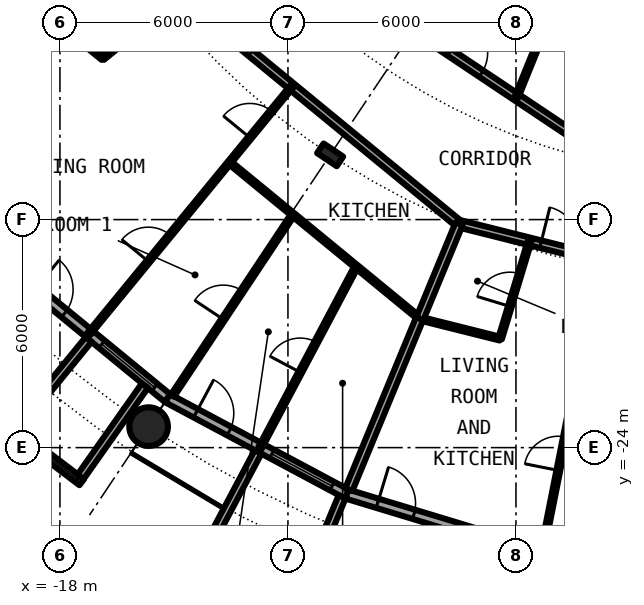
"""IFC4 building model, lengths in metres.
Left out: names, types, materials, properties, quantities, classifications, styles, units other than length and angle.
Written with IfcOpenShell. Run it as: python <this file> out.ifc"""

import sys

from ifc_helpers import new_model, si_unit, direction, frame, frame_2d, origin, origin_2d, place, context, subcontext, project, spatial, rectangle, circle, hollow_circle, i_section, extrude, element, fill, save


model = new_model("IFC4")
c1 = context("Model", 3, precision=1e-05, world=origin(), true_north=direction((0.0, 1.0)))
c2 = subcontext(c1, "Body", "Model", "MODEL_VIEW")
j1 = project(units=[si_unit("LENGTHUNIT", "METRE"), si_unit("PLANEANGLEUNIT", "RADIAN")], contexts=[c1])
p1 = place(None, origin())
s1 = spatial("IfcSite", under=j1, at=p1, CompositionType="ELEMENT")
p2 = place(p1, origin())
s2 = spatial("IfcBuilding", under=s1, at=p2, CompositionType="ELEMENT")
p3 = place(p2, frame((0.0, 0.0, 35.0)))
s3 = spatial("IfcBuildingStorey", under=s2, at=p3, CompositionType="ELEMENT", Elevation=35.0)
p4 = place(p3, frame((-15.667, -23.448, 0.0), z_axis=(0.0, 0.0, 1.0), x_axis=(1.0, 0.0, 0.0)))
e1 = element("IfcColumn", 1, at=p4, inside=s3, PredefinedType="COLUMN", context=c2, shape_type="SweptSolid", body=[
    extrude(hollow_circle(Radius=0.508, WallThickness=0.05, at=origin_2d()), origin(), (0.0, 0.0, 1.0), 3.05),
])
p5 = place(p3, frame((-10.889, -16.297, 0.0), z_axis=(0.0, 0.0, 1.0), x_axis=(-0.55557023302, -0.831469612303, 0.0)))
e2 = element("IfcColumn", 2, at=p5, inside=s3, PredefinedType="COLUMN", context=c2, shape_type="SweptSolid", body=[
    extrude(i_section(OverallWidth=0.305, OverallDepth=0.62, WebThickness=0.021, FlangeThickness=0.04, FilletRadius=0.027, at=origin_2d()), origin(), (0.0, 0.0, 1.0), 3.05),
])
p6 = place(p3, frame((-19.304, -19.304, 0.0), z_axis=(0.0, 0.0, 1.0), x_axis=(0.773019449054, -0.634382322723, 0.0)))
e3 = element("IfcWall", 3, at=p6, inside=s3, PredefinedType="SOLIDWALL", context=c2, shape_type="SweptSolid", body=[
    extrude(rectangle(XDim=5.352, YDim=0.25, at=frame_2d((2.676, 0.0))), origin(), (0.0, 0.0, 1.0), 2.7),
])
p7 = place(p6, frame((0.841, 0.0, 0.0)))
e4 = element("IfcOpeningElement", 4, at=p7, cuts=e3, PredefinedType="OPENING", context=c2, shape_type="SweptSolid", body=[
    extrude(rectangle(XDim=1.0, YDim=2.2, at=frame_2d((0.5, 1.1))), frame((0.0, 0.135, 0.0), z_axis=(0.0, -1.0, 0.0), x_axis=(1.0, 0.0, 0.0)), (0.0, 0.0, 1.0), 0.27),
])
p8 = place(p6, frame((3.111, 0.0, 0.3)))
e5 = element("IfcOpeningElement", 5, at=p8, cuts=e3, PredefinedType="OPENING", context=c2, shape_type="SweptSolid", body=[
    extrude(rectangle(XDim=1.8, YDim=2.1, at=frame_2d((0.9, 1.05))), frame((0.0, 0.135, 0.0), z_axis=(0.0, -1.0, 0.0), x_axis=(1.0, 0.0, 0.0)), (0.0, 0.0, 1.0), 0.27),
])
p9 = place(p3, frame((-19.289, -23.497, -0.03), z_axis=(0.0, 0.0, 1.0), x_axis=(0.796842165306, -0.60418752353, 0.0)))
e6 = element("IfcWall", 6, at=p9, inside=s3, PredefinedType="SOLIDWALL", context=c2, shape_type="SweptSolid", body=[
    extrude(rectangle(XDim=2.337, YDim=0.2, at=frame_2d((1.168, 0.0))), origin(), (0.0, 0.0, 1.0), 2.73),
])
p10 = place(p9, frame((0.128, 0.0, 0.33)))
e7 = element("IfcOpeningElement", 7, at=p10, cuts=e6, PredefinedType="OPENING", context=c2, shape_type="SweptSolid", body=[
    extrude(circle(Radius=1.04, at=frame_2d((1.04, 1.04))), frame((0.0, 0.11, 0.0), z_axis=(0.0, -1.0, 0.0), x_axis=(1.0, 0.0, 0.0)), (0.0, 0.0, 1.0), 0.22),
])
p11 = place(p3, frame((-17.246, -21.155, -0.03), z_axis=(0.0, 0.0, 1.0), x_axis=(-0.631741648902, -0.775179004516, 0.0)))
e8 = element("IfcWall", 8, at=p11, inside=s3, PredefinedType="SOLIDWALL", context=c2, shape_type="SweptSolid", body=[
    extrude(rectangle(XDim=3.006, YDim=0.2, at=frame_2d((1.503, 0.0))), origin(), (0.0, 0.0, 1.0), 2.73),
])
p12 = place(p3, frame((-15.765, -22.37, -0.03), z_axis=(0.0, 0.0, 1.0), x_axis=(-0.576274612209, -0.817256123454, 0.0)))
e9 = element("IfcWall", 9, at=p12, inside=s3, PredefinedType="SOLIDWALL", context=c2, shape_type="SweptSolid", body=[
    extrude(rectangle(XDim=2.933, YDim=0.2, at=frame_2d((1.466, 0.0))), origin(), (0.0, 0.0, 1.0), 2.73),
])
p13 = place(p3, frame((-15.167, -22.699, 0.0), z_axis=(0.0, 0.0, 1.0), x_axis=(0.881915646801, -0.471407246368, 0.0)))
e10 = element("IfcWall", 10, at=p13, inside=s3, PredefinedType="SOLIDWALL", context=c2, shape_type="SweptSolid", body=[
    extrude(rectangle(XDim=5.352, YDim=0.25, at=frame_2d((2.676, 0.0))), origin(), (0.0, 0.0, 1.0), 2.7),
])
p14 = place(p13, frame((0.841, 0.0, 0.0)))
e11 = element("IfcOpeningElement", 11, at=p14, cuts=e10, PredefinedType="OPENING", context=c2, shape_type="SweptSolid", body=[
    extrude(rectangle(XDim=1.0, YDim=2.2, at=frame_2d((0.5, 1.1))), frame((0.0, 0.135, 0.0), z_axis=(0.0, -1.0, 0.0), x_axis=(1.0, 0.0, 0.0)), (0.0, 0.0, 1.0), 0.27),
])
p15 = place(p13, frame((3.111, 0.0, 0.3)))
e12 = element("IfcOpeningElement", 12, at=p15, cuts=e10, PredefinedType="OPENING", context=c2, shape_type="SweptSolid", body=[
    extrude(rectangle(XDim=1.8, YDim=2.1, at=frame_2d((0.9, 1.05))), frame((0.0, 0.135, 0.0), z_axis=(0.0, -1.0, 0.0), x_axis=(1.0, 0.0, 0.0)), (0.0, 0.0, 1.0), 0.27),
])
p16 = place(p3, frame((-12.787, -24.113, -0.03), z_axis=(0.0, 0.0, 1.0), x_axis=(-0.468365282436, -0.883534924159, 0.0)))
e13 = element("IfcWall", 13, at=p16, inside=s3, PredefinedType="SOLIDWALL", context=c2, shape_type="SweptSolid", body=[
    extrude(rectangle(XDim=3.006, YDim=0.2, at=frame_2d((1.503, 0.0))), origin(), (0.0, 0.0, 1.0), 2.73),
])
p17 = place(p3, frame((-10.575, -25.295, -0.03), z_axis=(0.0, 0.0, 1.0), x_axis=(-0.385697364644, -0.922625353492, 0.0)))
e14 = element("IfcWall", 14, at=p17, inside=s3, PredefinedType="SOLIDWALL", context=c2, shape_type="SweptSolid", body=[
    extrude(rectangle(XDim=2.883, YDim=0.2, at=frame_2d((1.442, 0.0))), origin(), (0.0, 0.0, 1.0), 2.73),
])
p18 = place(p3, frame((-10.447, -25.222, 0.0), z_axis=(0.0, 0.0, 1.0), x_axis=(0.956965678721, -0.290201119486, 0.0)))
e15 = element("IfcWall", 15, at=p18, inside=s3, PredefinedType="SOLIDWALL", context=c2, shape_type="SweptSolid", body=[
    extrude(rectangle(XDim=5.351, YDim=0.25, at=frame_2d((2.676, 0.0))), origin(), (0.0, 0.0, 1.0), 2.7),
])
p19 = place(p18, frame((0.841, 0.0, 0.0)))
e16 = element("IfcOpeningElement", 16, at=p19, cuts=e15, PredefinedType="OPENING", context=c2, shape_type="SweptSolid", body=[
    extrude(rectangle(XDim=1.0, YDim=2.2, at=frame_2d((0.5, 1.1))), frame((0.0, 0.135, 0.0), z_axis=(0.0, -1.0, 0.0), x_axis=(1.0, 0.0, 0.0)), (0.0, 0.0, 1.0), 0.27),
])
p20 = place(p18, frame((3.111, 0.0, 0.3)))
e17 = element("IfcOpeningElement", 17, at=p20, cuts=e15, PredefinedType="OPENING", context=c2, shape_type="SweptSolid", body=[
    extrude(rectangle(XDim=1.8, YDim=2.1, at=frame_2d((0.9, 1.05))), frame((0.0, 0.135, 0.0), z_axis=(0.0, -1.0, 0.0), x_axis=(1.0, 0.0, 0.0)), (0.0, 0.0, 1.0), 0.27),
])
p21 = place(p3, frame((-8.534, -20.603, 0.0), z_axis=(0.0, 0.0, 1.0), x_axis=(0.97003047456, -0.242983288366, 0.0)))
e18 = element("IfcWall", 18, at=p21, inside=s3, PredefinedType="PARTITIONING", context=c2, shape_type="SweptSolid", body=[
    extrude(rectangle(XDim=2.181, YDim=0.1, at=frame_2d((1.091, 0.0))), origin(), (0.0, 0.0, 1.0), 2.7),
])
p22 = place(p3, frame((-18.542, -12.389, 0.0), z_axis=(0.0, 0.0, 1.0), x_axis=(0.772948171844, -0.634469166818, 0.0)))
e19 = element("IfcWall", 19, at=p22, inside=s3, PredefinedType="PARTITIONING", context=c2, shape_type="SweptSolid", body=[
    extrude(rectangle(XDim=2.158, YDim=0.1, at=frame_2d((1.079, 0.0))), origin(), (0.0, 0.0, 1.0), 2.7),
])
p23 = place(p3, frame((-13.538, -16.496, 0.0), z_axis=(0.0, 0.0, 1.0), x_axis=(0.773000340237, -0.634405606843, 0.0)))
e20 = element("IfcWall", 20, at=p23, inside=s3, PredefinedType="PARTITIONING", context=c2, shape_type="SweptSolid", body=[
    extrude(rectangle(XDim=6.474, YDim=0.1, at=frame_2d((3.237, 0.0))), origin(), (0.0, 0.0, 1.0), 2.7),
])
p24 = place(p3, frame((-7.501, -18.108, 0.0), z_axis=(0.0, 0.0, 1.0), x_axis=(0.970040840928, -0.242941900323, 0.0)))
e21 = element("IfcWall", 21, at=p24, inside=s3, PredefinedType="PARTITIONING", context=c2, shape_type="SweptSolid", body=[
    extrude(rectangle(XDim=3.676, YDim=0.2, at=frame_2d((1.838, 0.0))), origin(), (0.0, 0.0, 1.0), 2.38),
])
p25 = place(p24, frame((2.217, 0.0, 0.0)))
e22 = element("IfcOpeningElement", 22, at=p25, cuts=e21, PredefinedType="OPENING", context=c2, shape_type="SweptSolid", body=[
    extrude(rectangle(XDim=1.0, YDim=2.3, at=frame_2d((0.5, 1.15))), frame((0.0, 0.11, 0.0), z_axis=(0.0, -1.0, 0.0), x_axis=(1.0, 0.0, 0.0)), (0.0, 0.0, 1.0), 0.22),
])
p26 = place(p3, frame((-16.173, -10.99, 0.0), z_axis=(0.0, 0.0, 1.0), x_axis=(0.772704887747, -0.634765434198, 0.0)))
e23 = element("IfcWall", 23, at=p26, inside=s3, PredefinedType="PARTITIONING", context=c2, shape_type="SweptSolid", body=[
    extrude(rectangle(XDim=11.209, YDim=0.2, at=frame_2d((5.604, 0.0))), origin(), (0.0, 0.0, 1.0), 2.38),
])
p27 = place(p26, frame((3.137, 0.0, 0.0)))
e24 = element("IfcOpeningElement", 24, at=p27, cuts=e23, PredefinedType="OPENING", context=c2, shape_type="SweptSolid", body=[
    extrude(rectangle(XDim=1.0, YDim=2.3, at=frame_2d((0.5, 1.15))), frame((0.0, 0.11, 0.0), z_axis=(0.0, -1.0, 0.0), x_axis=(1.0, 0.0, 0.0)), (0.0, 0.0, 1.0), 0.22),
])
p28 = place(p3, frame((-14.036, -9.402, 0.0), z_axis=(0.0, 0.0, 1.0), x_axis=(0.831561346449, -0.555432918625, 0.0)))
e25 = element("IfcWall", 25, at=p28, inside=s3, PredefinedType="PARTITIONING", context=c2, shape_type="SweptSolid", body=[
    extrude(rectangle(XDim=12.914, YDim=0.2, at=frame_2d((6.457, 0.0))), origin(), (0.0, 0.0, 1.0), 2.7),
])
p29 = place(p28, frame((7.566, 0.0, 0.0)))
e26 = element("IfcOpeningElement", 26, at=p29, cuts=e25, PredefinedType="OPENING", context=c2, shape_type="SweptSolid", body=[
    extrude(rectangle(XDim=1.0, YDim=2.3, at=frame_2d((0.5, 1.15))), frame((0.0, 0.11, 0.0), z_axis=(0.0, -1.0, 0.0), x_axis=(1.0, 0.0, 0.0)), (0.0, 0.0, 1.0), 0.22),
])
p30 = place(p3, frame((-5.029, -12.418, 0.0), z_axis=(0.0, 0.0, 1.0), x_axis=(0.831538390496, -0.555467285384, 0.0)))
e27 = element("IfcWall", 27, at=p30, inside=s3, PredefinedType="PARTITIONING", context=c2, shape_type="SweptSolid", body=[
    extrude(rectangle(XDim=2.717, YDim=0.1, at=frame_2d((1.358, 0.0))), origin(), (0.0, 0.0, 1.0), 2.7),
])
p31 = place(p30, frame((0.908, 0.0, 0.0)))
e28 = element("IfcOpeningElement", 28, at=p31, cuts=e27, PredefinedType="OPENING", context=c2, shape_type="SweptSolid", body=[
    extrude(rectangle(XDim=0.9, YDim=2.3, at=frame_2d((0.45, 1.15))), frame((0.0, 0.06, 0.0), z_axis=(0.0, -1.0, 0.0), x_axis=(1.0, 0.0, 0.0)), (0.0, 0.0, 1.0), 0.12),
])
p32 = place(p3, frame((-22.596, -15.097, 0.0), z_axis=(0.0, 0.0, 1.0), x_axis=(0.831610607528, 0.555359160765, 0.0)))
e29 = element("IfcWall", 29, at=p32, inside=s3, PredefinedType="PARTITIONING", context=c2, shape_type="SweptSolid", body=[
    extrude(rectangle(XDim=7.265, YDim=0.2, at=frame_2d((3.633, 0.0))), origin(), (0.0, 0.0, 1.0), 2.7),
])
p33 = place(p3, frame((-17.24, -21.007, 0.0), z_axis=(0.0, 0.0, 1.0), x_axis=(0.634396151441, 0.77300810024, 0.0)))
e30 = element("IfcWall", 30, at=p33, inside=s3, PredefinedType="PARTITIONING", context=c2, shape_type="SweptSolid", body=[
    extrude(rectangle(XDim=8.419, YDim=0.1, at=frame_2d((4.209, 0.0))), origin(), (0.0, 0.0, 1.0), 2.7),
])
p34 = place(p33, frame((6.679, 0.0, 0.0)))
e31 = element("IfcOpeningElement", 31, at=p34, cuts=e30, PredefinedType="OPENING", context=c2, shape_type="SweptSolid", body=[
    extrude(rectangle(XDim=0.9, YDim=2.3, at=frame_2d((0.45, 1.15))), frame((0.0, 0.06, 0.0), z_axis=(0.0, -1.0, 0.0), x_axis=(1.0, 0.0, 0.0)), (0.0, 0.0, 1.0), 0.12),
])
p35 = place(p33, frame((2.468, 0.0, 0.0)))
e32 = element("IfcOpeningElement", 32, at=p35, cuts=e30, PredefinedType="OPENING", context=c2, shape_type="SweptSolid", body=[
    extrude(rectangle(XDim=0.9, YDim=2.3, at=frame_2d((0.45, 1.15))), frame((0.0, 0.06, 0.0), z_axis=(0.0, -1.0, 0.0), x_axis=(1.0, 0.0, 0.0)), (0.0, 0.0, 1.0), 0.12),
])
p36 = place(p3, frame((-16.874, -13.758, 0.0), z_axis=(0.0, 0.0, 1.0), x_axis=(0.774979608522, 0.631986239072, 0.0)))
e33 = element("IfcWall", 33, at=p36, inside=s3, PredefinedType="PARTITIONING", context=c2, shape_type="SweptSolid", body=[
    extrude(rectangle(XDim=2.636, YDim=0.1, at=frame_2d((1.318, 0.0))), origin(), (0.0, 0.0, 1.0), 2.7),
])
p37 = place(p36, frame((0.868, 0.0, 0.0)))
e34 = element("IfcOpeningElement", 34, at=p37, cuts=e33, PredefinedType="OPENING", context=c2, shape_type="SweptSolid", body=[
    extrude(rectangle(XDim=0.9, YDim=2.3, at=frame_2d((0.45, 1.15))), frame((0.0, 0.06, 0.0), z_axis=(0.0, -1.0, 0.0), x_axis=(1.0, 0.0, 0.0)), (0.0, 0.0, 1.0), 0.12),
])
p38 = place(p3, frame((-15.039, -22.634, 0.0), z_axis=(0.0, 0.0, 1.0), x_axis=(0.553440102418, 0.832888980018, 0.0)))
e35 = element("IfcWall", 35, at=p38, inside=s3, PredefinedType="PARTITIONING", context=c2, shape_type="SweptSolid", body=[
    extrude(rectangle(XDim=5.726, YDim=0.1, at=frame_2d((2.863, 0.0))), origin(), (0.0, 0.0, 1.0), 2.7),
])
p39 = place(p38, frame((2.413, 0.0, 0.0)))
e36 = element("IfcOpeningElement", 36, at=p39, cuts=e35, PredefinedType="OPENING", context=c2, shape_type="SweptSolid", body=[
    extrude(rectangle(XDim=0.9, YDim=2.3, at=frame_2d((0.45, 1.15))), frame((0.0, 0.06, 0.0), z_axis=(0.0, -1.0, 0.0), x_axis=(1.0, 0.0, 0.0)), (0.0, 0.0, 1.0), 0.12),
])
p40 = place(p3, frame((-12.734, -24.007, 0.0), z_axis=(0.0, 0.0, 1.0), x_axis=(0.468610030042, 0.883405139075, 0.0)))
e37 = element("IfcWall", 37, at=p40, inside=s3, PredefinedType="PARTITIONING", context=c2, shape_type="SweptSolid", body=[
    extrude(rectangle(XDim=5.403, YDim=0.1, at=frame_2d((2.702, 0.0))), origin(), (0.0, 0.0, 1.0), 2.7),
])
p41 = place(p40, frame((2.252, 0.0, 0.0)))
e38 = element("IfcOpeningElement", 38, at=p41, cuts=e37, PredefinedType="OPENING", context=c2, shape_type="SweptSolid", body=[
    extrude(rectangle(XDim=0.9, YDim=2.3, at=frame_2d((0.45, 1.15))), frame((0.0, 0.06, 0.0), z_axis=(0.0, -1.0, 0.0), x_axis=(1.0, 0.0, 0.0)), (0.0, 0.0, 1.0), 0.12),
])
p42 = place(p3, frame((-10.399, -25.106, 0.0), z_axis=(0.0, 0.0, 1.0), x_axis=(0.382651153718, 0.923892902104, 0.0)))
e39 = element("IfcWall", 39, at=p42, inside=s3, PredefinedType="PARTITIONING", context=c2, shape_type="SweptSolid", body=[
    extrude(rectangle(XDim=4.874, YDim=0.2, at=frame_2d((2.437, 0.0))), origin(), (0.0, 0.0, 1.0), 2.7),
])
p43 = place(p3, frame((-8.529, -20.605, 0.0), z_axis=(0.0, 0.0, 1.0), x_axis=(0.382540781694, 0.923938607452, 0.0)))
e40 = element("IfcWall", 40, at=p43, inside=s3, PredefinedType="PARTITIONING", context=c2, shape_type="SweptSolid", body=[
    extrude(rectangle(XDim=2.7, YDim=0.2, at=frame_2d((1.35, 0.0))), origin(), (0.0, 0.0, 1.0), 2.7),
])
p44 = place(p3, frame((-6.418, -21.133, 0.0), z_axis=(0.0, 0.0, 1.0), x_axis=(0.290478618436, 0.956881482855, 0.0)))
e41 = element("IfcWall", 41, at=p44, inside=s3, PredefinedType="PARTITIONING", context=c2, shape_type="SweptSolid", body=[
    extrude(rectangle(XDim=2.674, YDim=0.1, at=frame_2d((1.337, 0.0))), origin(), (0.0, 0.0, 1.0), 2.7),
])
p45 = place(p44, frame((0.887, 0.0, 0.0)))
e42 = element("IfcOpeningElement", 42, at=p45, cuts=e41, PredefinedType="OPENING", context=c2, shape_type="SweptSolid", body=[
    extrude(rectangle(XDim=0.9, YDim=2.3, at=frame_2d((0.45, 1.15))), frame((0.0, 0.06, 0.0), z_axis=(0.0, -1.0, 0.0), x_axis=(1.0, 0.0, 0.0)), (0.0, 0.0, 1.0), 0.12),
])
p46 = place(p3, frame((-5.986, -14.779, 0.0), z_axis=(0.0, 0.0, 1.0), x_axis=(0.375649498413, 0.926761811008, 0.0)))
e43 = element("IfcWall", 43, at=p46, inside=s3, PredefinedType="PARTITIONING", context=c2, shape_type="SweptSolid", body=[
    extrude(rectangle(XDim=2.548, YDim=0.1, at=frame_2d((1.274, 0.0))), origin(), (0.0, 0.0, 1.0), 2.7),
])
p47 = place(p3, frame((-5.293, -26.655, 0.0), z_axis=(0.0, 0.0, 1.0), x_axis=(0.194713709563, 0.980860118115, 0.0)))
e44 = element("IfcWall", 44, at=p47, inside=s3, PredefinedType="PARTITIONING", context=c2, shape_type="SweptSolid", body=[
    extrude(rectangle(XDim=5.089, YDim=0.1, at=frame_2d((2.545, 0.0))), origin(), (0.0, 0.0, 1.0), 2.7),
])
p48 = place(p47, frame((2.095, 0.0, 0.0)))
e45 = element("IfcOpeningElement", 45, at=p48, cuts=e44, PredefinedType="OPENING", context=c2, shape_type="SweptSolid", body=[
    extrude(rectangle(XDim=0.9, YDim=2.3, at=frame_2d((0.45, 1.15))), frame((0.0, 0.06, 0.0), z_axis=(0.0, -1.0, 0.0), x_axis=(1.0, 0.0, 0.0)), (0.0, 0.0, 1.0), 0.12),
])
p49 = place(p7, origin())
e46 = element("IfcDoor", 46, at=p49, inside=s3, OperationType="SINGLE_SWING_LEFT", PredefinedType="DOOR", context=c2, shape_type="SweptSolid", body=[
    extrude(rectangle(XDim=1.0, YDim=2.2, at=frame_2d((0.5, 1.1))), frame((0.0, 0.025, 0.0), z_axis=(0.0, -1.0, 0.0), x_axis=(1.0, 0.0, 0.0)), (0.0, 0.0, 1.0), 0.05),
])
fill(e4, e46)
p50 = place(p8, origin())
e47 = element("IfcWindow", 47, at=p50, inside=s3, PartitioningType="SINGLE_PANEL", PredefinedType="WINDOW", context=c2, shape_type="SweptSolid", body=[
    extrude(rectangle(XDim=1.8, YDim=2.1, at=frame_2d((0.9, 1.05))), frame((0.0, 0.03, 0.0), z_axis=(0.0, -1.0, 0.0), x_axis=(1.0, 0.0, 0.0)), (0.0, 0.0, 1.0), 0.06),
])
fill(e5, e47)
p51 = place(p10, origin())
e48 = element("IfcWindow", 48, at=p51, inside=s3, PartitioningType="SINGLE_PANEL", PredefinedType="WINDOW", context=c2, shape_type="SweptSolid", body=[
    extrude(circle(Radius=1.04, at=frame_2d((1.04, 1.04))), frame((0.0, 0.03, 0.0), z_axis=(0.0, -1.0, 0.0), x_axis=(1.0, 0.0, 0.0)), (0.0, 0.0, 1.0), 0.06),
])
fill(e7, e48)
p52 = place(p14, origin())
e49 = element("IfcDoor", 49, at=p52, inside=s3, OperationType="SINGLE_SWING_LEFT", PredefinedType="DOOR", context=c2, shape_type="SweptSolid", body=[
    extrude(rectangle(XDim=1.0, YDim=2.2, at=frame_2d((0.5, 1.1))), frame((0.0, 0.025, 0.0), z_axis=(0.0, -1.0, 0.0), x_axis=(1.0, 0.0, 0.0)), (0.0, 0.0, 1.0), 0.05),
])
fill(e11, e49)
p53 = place(p15, origin())
e50 = element("IfcWindow", 50, at=p53, inside=s3, PartitioningType="SINGLE_PANEL", PredefinedType="WINDOW", context=c2, shape_type="SweptSolid", body=[
    extrude(rectangle(XDim=1.8, YDim=2.1, at=frame_2d((0.9, 1.05))), frame((0.0, 0.03, 0.0), z_axis=(0.0, -1.0, 0.0), x_axis=(1.0, 0.0, 0.0)), (0.0, 0.0, 1.0), 0.06),
])
fill(e12, e50)
p54 = place(p19, origin())
e51 = element("IfcDoor", 51, at=p54, inside=s3, OperationType="SINGLE_SWING_LEFT", PredefinedType="DOOR", context=c2, shape_type="SweptSolid", body=[
    extrude(rectangle(XDim=1.0, YDim=2.2, at=frame_2d((0.5, 1.1))), frame((0.0, 0.025, 0.0), z_axis=(0.0, -1.0, 0.0), x_axis=(1.0, 0.0, 0.0)), (0.0, 0.0, 1.0), 0.05),
])
fill(e16, e51)
p55 = place(p27, origin())
e52 = element("IfcDoor", 52, at=p55, inside=s3, OperationType="SINGLE_SWING_LEFT", PredefinedType="DOOR", context=c2, shape_type="SweptSolid", body=[
    extrude(rectangle(XDim=1.0, YDim=2.3, at=frame_2d((0.5, 1.15))), frame((0.0, 0.025, 0.0), z_axis=(0.0, -1.0, 0.0), x_axis=(1.0, 0.0, 0.0)), (0.0, 0.0, 1.0), 0.05),
])
fill(e24, e52)
p56 = place(p34, origin())
e53 = element("IfcDoor", 53, at=p56, inside=s3, OperationType="SINGLE_SWING_RIGHT", PredefinedType="DOOR", context=c2, shape_type="SweptSolid", body=[
    extrude(rectangle(XDim=0.9, YDim=2.3, at=frame_2d((0.45, 1.15))), frame((0.0, 0.025, 0.0), z_axis=(0.0, -1.0, 0.0), x_axis=(1.0, 0.0, 0.0)), (0.0, 0.0, 1.0), 0.05),
])
fill(e31, e53)
p57 = place(p35, origin())
e54 = element("IfcDoor", 54, at=p57, inside=s3, OperationType="SINGLE_SWING_LEFT", PredefinedType="DOOR", context=c2, shape_type="SweptSolid", body=[
    extrude(rectangle(XDim=0.9, YDim=2.3, at=frame_2d((0.45, 1.15))), frame((0.0, 0.025, 0.0), z_axis=(0.0, -1.0, 0.0), x_axis=(1.0, 0.0, 0.0)), (0.0, 0.0, 1.0), 0.05),
])
fill(e32, e54)
p58 = place(p39, origin())
e55 = element("IfcDoor", 55, at=p58, inside=s3, OperationType="SINGLE_SWING_RIGHT", PredefinedType="DOOR", context=c2, shape_type="SweptSolid", body=[
    extrude(rectangle(XDim=0.9, YDim=2.3, at=frame_2d((0.45, 1.15))), frame((0.0, 0.025, 0.0), z_axis=(0.0, -1.0, 0.0), x_axis=(1.0, 0.0, 0.0)), (0.0, 0.0, 1.0), 0.05),
])
fill(e36, e55)
p59 = place(p41, origin())
e56 = element("IfcDoor", 56, at=p59, inside=s3, OperationType="SINGLE_SWING_LEFT", PredefinedType="DOOR", context=c2, shape_type="SweptSolid", body=[
    extrude(rectangle(XDim=0.9, YDim=2.3, at=frame_2d((0.45, 1.15))), frame((0.0, 0.025, 0.0), z_axis=(0.0, -1.0, 0.0), x_axis=(1.0, 0.0, 0.0)), (0.0, 0.0, 1.0), 0.05),
])
fill(e38, e56)
p60 = place(p25, origin())
e57 = element("IfcDoor", 57, at=p60, inside=s3, OperationType="SINGLE_SWING_RIGHT", PredefinedType="DOOR", context=c2, shape_type="SweptSolid", body=[
    extrude(rectangle(XDim=1.0, YDim=2.3, at=frame_2d((0.5, 1.15))), frame((0.0, 0.025, 0.0), z_axis=(0.0, -1.0, 0.0), x_axis=(1.0, 0.0, 0.0)), (0.0, 0.0, 1.0), 0.05),
])
fill(e22, e57)
p61 = place(p45, origin())
e58 = element("IfcDoor", 58, at=p61, inside=s3, OperationType="SINGLE_SWING_LEFT", PredefinedType="DOOR", context=c2, shape_type="SweptSolid", body=[
    extrude(rectangle(XDim=0.9, YDim=2.3, at=frame_2d((0.45, 1.15))), frame((0.0, 0.025, 0.0), z_axis=(0.0, -1.0, 0.0), x_axis=(1.0, 0.0, 0.0)), (0.0, 0.0, 1.0), 0.05),
])
fill(e42, e58)
p62 = place(p48, origin())
e59 = element("IfcDoor", 59, at=p62, inside=s3, OperationType="SINGLE_SWING_RIGHT", PredefinedType="DOOR", context=c2, shape_type="SweptSolid", body=[
    extrude(rectangle(XDim=0.9, YDim=2.3, at=frame_2d((0.45, 1.15))), frame((0.0, 0.025, 0.0), z_axis=(0.0, -1.0, 0.0), x_axis=(1.0, 0.0, 0.0)), (0.0, 0.0, 1.0), 0.05),
])
fill(e45, e59)
p63 = place(p29, origin())
e60 = element("IfcDoor", 60, at=p63, inside=s3, OperationType="SINGLE_SWING_RIGHT", PredefinedType="DOOR", context=c2, shape_type="SweptSolid", body=[
    extrude(rectangle(XDim=1.0, YDim=2.3, at=frame_2d((0.5, 1.15))), frame((0.0, 0.025, 0.0), z_axis=(0.0, -1.0, 0.0), x_axis=(1.0, 0.0, 0.0)), (0.0, 0.0, 1.0), 0.05),
])
fill(e26, e60)
save(model, sys.argv[1])
